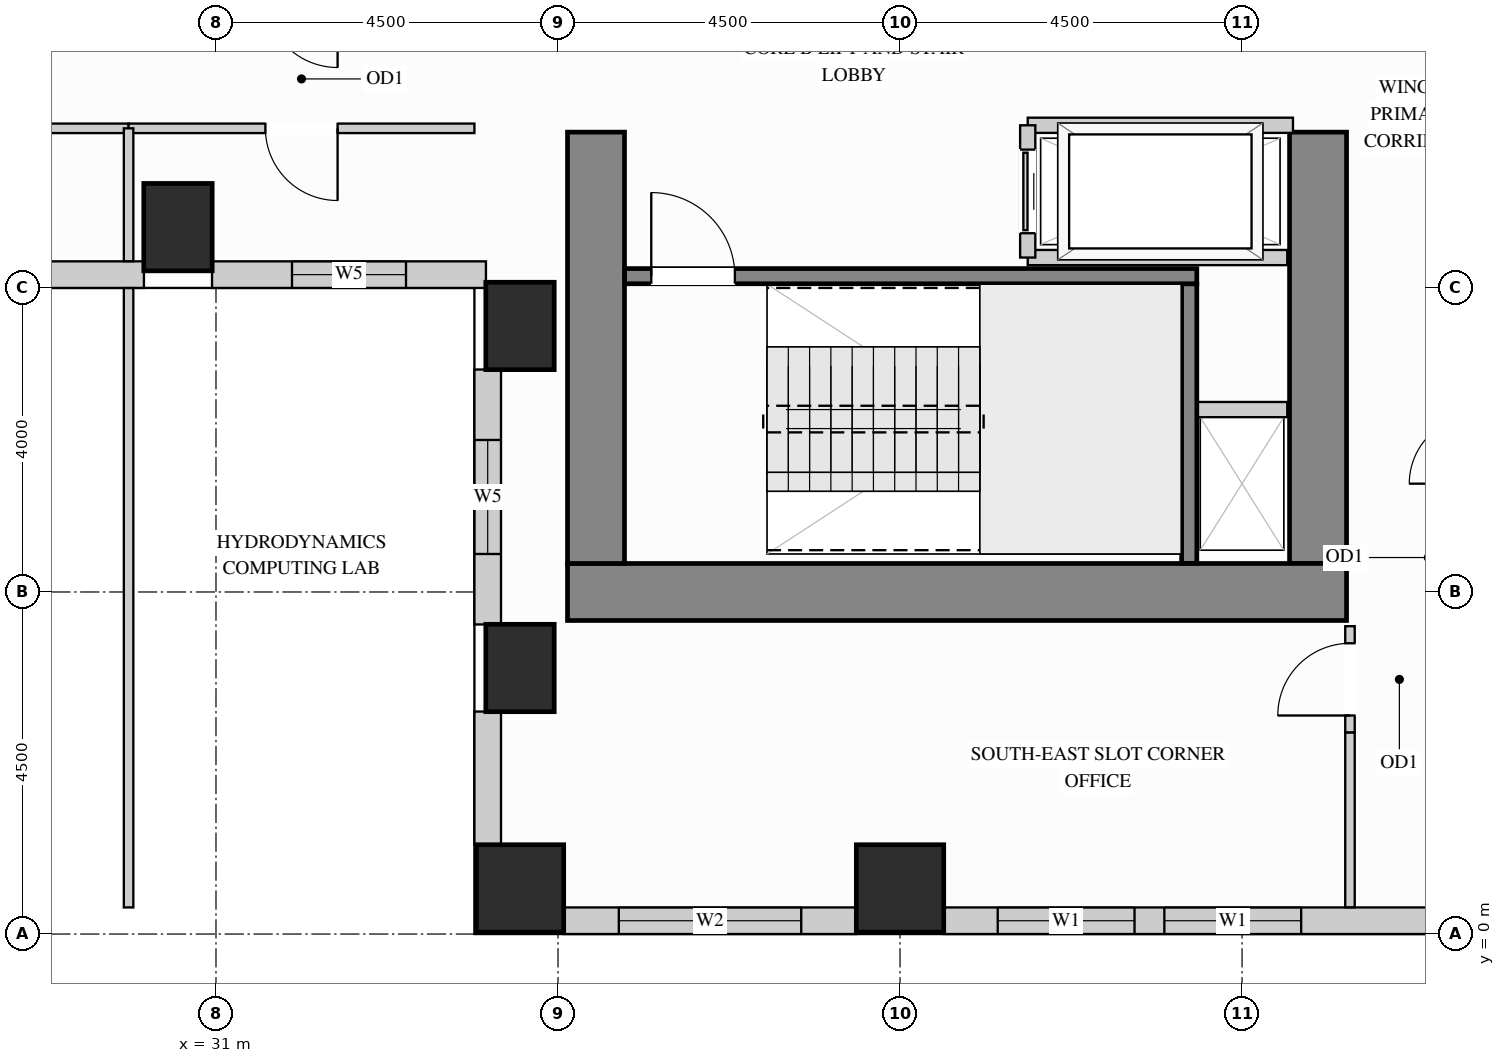
"""IFC4 building model, lengths in metres.
Left out: names, types, materials, properties, quantities, classifications, styles, units other than length and angle.
Written with IfcOpenShell. Run it as: python <this file> out.ifc"""

import sys

from ifc_helpers import new_model, si_unit, direction, frame, frame_2d, origin, origin_2d, place, context, subcontext, project, spatial, rectangle, extrude, source, transform, mapped, element, fill, save


model = new_model("IFC4")
c1 = context("Model", 3, precision=1e-05, world=origin(), true_north=direction((0.0, 1.0)))
c2 = subcontext(c1, "Body", "Model", "MODEL_VIEW")
j1 = project(units=[si_unit("LENGTHUNIT", "METRE"), si_unit("PLANEANGLEUNIT", "RADIAN")], contexts=[c1])
p1 = place(None, origin())
s1 = spatial("IfcSite", under=j1, at=p1, CompositionType="ELEMENT")
p2 = place(p1, origin())
s2 = spatial("IfcBuilding", under=s1, at=p2, CompositionType="ELEMENT")
p3 = place(p2, frame((0.0, 0.0, 95.4)))
s3 = spatial("IfcBuildingStorey", under=s2, at=p3, CompositionType="ELEMENT", Elevation=95.4)
m1 = source(origin(), c2, "Body", "SweptSolid", [
    extrude(rectangle(XDim=0.9, YDim=1.15, at=origin_2d()), origin(), (0.0, 0.0, 1.0), 3.38),
])
for number, where, z_axis, x_axis in (
    (1, (35.0, 3.5, 0.0), (0.0, 0.0, 1.0), (1.0, 0.0, 0.0)),
    (2, (35.0, 8.0, 0.0), (0.0, 0.0, 1.0), (1.0, 0.0, 0.0)),
    (3, (30.5, 9.3, 0.0), (0.0, 0.0, 1.0), (1.0, 0.0, 0.0)),
):
    element("IfcColumn", number, at=place(p3, frame(where, z_axis=z_axis, x_axis=x_axis)), inside=s3, PredefinedType="COLUMN", context=c2, shape_type="MappedRepresentation", body=[
        mapped(m1, transform((0.0, 0.0, 0.0), x_axis=(1.0, 0.0, 0.0), y_axis=(0.0, 1.0, 0.0), z_axis=(0.0, 0.0, 1.0))),
    ])
m2 = source(origin(), c2, "Body", "SweptSolid", [
    extrude(rectangle(XDim=1.15, YDim=1.15, at=origin_2d()), origin(), (0.0, 0.0, 1.0), 3.38),
])
for number, where, z_axis, x_axis in (
    (4, (35.0, 0.6, 0.0), (0.0, 0.0, 1.0), (1.0, 0.0, 0.0)),
    (5, (40.0, 0.6, 0.0), (0.0, 0.0, 1.0), (1.0, 0.0, 0.0)),
):
    element("IfcColumn", number, at=place(p3, frame(where, z_axis=z_axis, x_axis=x_axis)), inside=s3, PredefinedType="COLUMN", context=c2, shape_type="MappedRepresentation", body=[
        mapped(m2, transform((0.0, 0.0, 0.0), x_axis=(1.0, 0.0, 0.0), y_axis=(0.0, 1.0, 0.0), z_axis=(0.0, 0.0, 1.0))),
    ])
m3 = source(origin(), c2, "Body", "SweptSolid", [
    extrude(rectangle(XDim=5.675, YDim=0.75, at=frame_2d((2.837, 0.0))), origin(), (0.0, 0.0, 1.0), 3.38),
])
p4 = place(p3, frame((45.5, 4.875, 0.0), z_axis=(0.0, 0.0, 1.0), x_axis=(0.0, 1.0, 0.0)))
e6 = element("IfcWall", 6, at=p4, inside=s3, PredefinedType="SHEAR", context=c2, shape_type="MappedRepresentation", body=[
    mapped(m3, transform((0.0, 0.0, 0.0), x_axis=(1.0, 0.0, 0.0), y_axis=(0.0, 1.0, 0.0), z_axis=(0.0, 0.0, 1.0))),
])
m4 = source(origin(), c2, "Body", "SweptSolid", [
    extrude(rectangle(XDim=10.25, YDim=0.75, at=frame_2d((5.125, 0.0))), origin(), (0.0, 0.0, 1.0), 3.38),
])
p5 = place(p3, frame((35.625, 4.5, 0.0), z_axis=(0.0, 0.0, 1.0), x_axis=(1.0, 0.0, 0.0)))
e7 = element("IfcWall", 7, at=p5, inside=s3, PredefinedType="SHEAR", context=c2, shape_type="MappedRepresentation", body=[
    mapped(m4, transform((0.0, 0.0, 0.0), x_axis=(1.0, 0.0, 0.0), y_axis=(0.0, 1.0, 0.0), z_axis=(0.0, 0.0, 1.0))),
])
p6 = place(p3, frame((36.0, 4.875, 0.0), z_axis=(0.0, 0.0, 1.0), x_axis=(0.0, 1.0, 0.0)))
e8 = element("IfcWall", 8, at=p6, inside=s3, PredefinedType="SHEAR", context=c2, shape_type="MappedRepresentation", body=[
    mapped(m3, transform((0.0, 0.0, 0.0), x_axis=(1.0, 0.0, 0.0), y_axis=(0.0, 1.0, 0.0), z_axis=(0.0, 0.0, 1.0))),
])
p7 = place(p3, frame((23.848, 8.675, 0.0), z_axis=(0.0, 0.0, 1.0), x_axis=(1.0, 0.0, 0.0)))
e9 = element("IfcWall", 9, at=p7, inside=s3, PredefinedType="SOLIDWALL", context=c2, shape_type="SweptSolid", body=[
    extrude(rectangle(XDim=6.204, YDim=0.35, at=frame_2d((3.102, 0.0))), origin(), (0.0, 0.0, 1.0), 3.365),
])
p8 = place(p7, frame((1.131, 0.0, 0.78)))
e10 = element("IfcOpeningElement", 10, at=p8, cuts=e9, PredefinedType="OPENING", context=c2, shape_type="SweptSolid", body=[
    extrude(rectangle(XDim=1.5, YDim=2.0, at=frame_2d((0.75, 1.0))), frame((0.0, 0.185, 0.0), z_axis=(0.0, -1.0, 0.0), x_axis=(1.0, 0.0, 0.0)), (0.0, 0.0, 1.0), 0.37),
])
p9 = place(p7, frame((3.441, 0.0, 0.78)))
e11 = element("IfcOpeningElement", 11, at=p9, cuts=e9, PredefinedType="OPENING", context=c2, shape_type="SweptSolid", body=[
    extrude(rectangle(XDim=1.5, YDim=2.0, at=frame_2d((0.75, 1.0))), frame((0.0, 0.185, 0.0), z_axis=(0.0, -1.0, 0.0), x_axis=(1.0, 0.0, 0.0)), (0.0, 0.0, 1.0), 0.37),
])
p10 = place(p3, frame((30.948, 8.675, 0.0), z_axis=(0.0, 0.0, 1.0), x_axis=(1.0, 0.0, 0.0)))
e12 = element("IfcWall", 12, at=p10, inside=s3, PredefinedType="SOLIDWALL", context=c2, shape_type="SweptSolid", body=[
    extrude(rectangle(XDim=3.604, YDim=0.35, at=frame_2d((1.802, 0.0))), origin(), (0.0, 0.0, 1.0), 3.365),
])
p11 = place(p10, frame((1.052, 0.0, 0.78)))
e13 = element("IfcOpeningElement", 13, at=p11, cuts=e12, PredefinedType="OPENING", context=c2, shape_type="SweptSolid", body=[
    extrude(rectangle(XDim=1.5, YDim=2.0, at=frame_2d((0.75, 1.0))), frame((0.0, 0.185, 0.0), z_axis=(0.0, -1.0, 0.0), x_axis=(1.0, 0.0, 0.0)), (0.0, 0.0, 1.0), 0.37),
])
p12 = place(p3, frame((34.575, 7.427, 0.0), z_axis=(0.0, 0.0, 1.0), x_axis=(0.0, -1.0, 0.0)))
e14 = element("IfcWall", 14, at=p12, inside=s3, PredefinedType="SOLIDWALL", context=c2, shape_type="SweptSolid", body=[
    extrude(rectangle(XDim=3.354, YDim=0.35, at=frame_2d((1.677, 0.0))), origin(), (0.0, 0.0, 1.0), 3.365),
])
p13 = place(p12, frame((0.927, 0.0, 0.78)))
e15 = element("IfcOpeningElement", 15, at=p13, cuts=e14, PredefinedType="OPENING", context=c2, shape_type="SweptSolid", body=[
    extrude(rectangle(XDim=1.5, YDim=2.0, at=frame_2d((0.75, 1.0))), frame((0.0, 0.185, 0.0), z_axis=(0.0, -1.0, 0.0), x_axis=(1.0, 0.0, 0.0)), (0.0, 0.0, 1.0), 0.37),
])
m5 = source(origin(), c2, "Body", "SweptSolid", [
    extrude(rectangle(XDim=1.754, YDim=0.35, at=frame_2d((0.877, 0.0))), origin(), (0.0, 0.0, 1.0), 3.365),
])
p14 = place(p3, frame((34.575, 2.927, 0.0), z_axis=(0.0, 0.0, 1.0), x_axis=(0.0, -1.0, 0.0)))
e16 = element("IfcWall", 16, at=p14, inside=s3, PredefinedType="SOLIDWALL", context=c2, shape_type="MappedRepresentation", body=[
    mapped(m5, transform((0.0, 0.0, 0.0), x_axis=(1.0, 0.0, 0.0), y_axis=(0.0, 1.0, 0.0), z_axis=(0.0, 0.0, 1.0))),
])
p15 = place(p3, frame((35.573, 0.175, 0.0), z_axis=(0.0, 0.0, 1.0), x_axis=(1.0, 0.0, 0.0)))
e17 = element("IfcWall", 17, at=p15, inside=s3, PredefinedType="SOLIDWALL", context=c2, shape_type="SweptSolid", body=[
    extrude(rectangle(XDim=3.854, YDim=0.35, at=frame_2d((1.927, 0.0))), origin(), (0.0, 0.0, 1.0), 3.365),
])
p16 = place(p15, frame((0.727, 0.0, 0.78)))
e18 = element("IfcOpeningElement", 18, at=p16, cuts=e17, PredefinedType="OPENING", context=c2, shape_type="SweptSolid", body=[
    extrude(rectangle(XDim=2.4, YDim=2.1, at=frame_2d((1.2, 1.05))), frame((0.0, 0.185, 0.0), z_axis=(0.0, -1.0, 0.0), x_axis=(1.0, 0.0, 0.0)), (0.0, 0.0, 1.0), 0.37),
])
p17 = place(p3, frame((40.573, 0.175, 0.0), z_axis=(0.0, 0.0, 1.0), x_axis=(1.0, 0.0, 0.0)))
e19 = element("IfcWall", 19, at=p17, inside=s3, PredefinedType="SOLIDWALL", context=c2, shape_type="SweptSolid", body=[
    extrude(rectangle(XDim=6.454, YDim=0.35, at=frame_2d((3.227, 0.0))), origin(), (0.0, 0.0, 1.0), 3.365),
])
p18 = place(p17, frame((0.712, 0.0, 0.78)))
e20 = element("IfcOpeningElement", 20, at=p18, cuts=e19, PredefinedType="OPENING", context=c2, shape_type="SweptSolid", body=[
    extrude(rectangle(XDim=1.8, YDim=2.1, at=frame_2d((0.9, 1.05))), frame((0.0, 0.185, 0.0), z_axis=(0.0, -1.0, 0.0), x_axis=(1.0, 0.0, 0.0)), (0.0, 0.0, 1.0), 0.37),
])
p19 = place(p17, frame((2.905, 0.0, 0.78)))
e21 = element("IfcOpeningElement", 21, at=p19, cuts=e19, PredefinedType="OPENING", context=c2, shape_type="SweptSolid", body=[
    extrude(rectangle(XDim=1.8, YDim=2.1, at=frame_2d((0.9, 1.05))), frame((0.0, 0.185, 0.0), z_axis=(0.0, -1.0, 0.0), x_axis=(1.0, 0.0, 0.0)), (0.0, 0.0, 1.0), 0.37),
])
p20 = place(p3, frame((45.92, 2.65, 0.0), z_axis=(0.0, 0.0, 1.0), x_axis=(0.0, 1.0, 0.0)))
e22 = element("IfcWall", 22, at=p20, inside=s3, PredefinedType="PARTITIONING", context=c2, shape_type="SweptSolid", body=[
    extrude(rectangle(XDim=1.4, YDim=0.125, at=frame_2d((0.7, 0.0))), origin(), (0.0, 0.0, 1.0), 3.365),
])
p21 = place(p20, frame((0.225, 0.0, 0.0)))
e23 = element("IfcOpeningElement", 23, at=p21, cuts=e22, PredefinedType="OPENING", context=c2, shape_type="SweptSolid", body=[
    extrude(rectangle(XDim=0.95, YDim=2.15, at=frame_2d((0.475, 1.075))), frame((0.0, 0.073, 0.0), z_axis=(0.0, -1.0, 0.0), x_axis=(1.0, 0.0, 0.0)), (0.0, 0.0, 1.0), 0.145),
])
m6 = source(origin(), c2, "Body", "SweptSolid", [
    extrude(rectangle(XDim=2.298, YDim=0.125, at=frame_2d((1.149, 0.0))), origin(), (0.0, 0.0, 1.0), 3.365),
])
p22 = place(p3, frame((45.92, 0.352, 0.0), z_axis=(0.0, 0.0, 1.0), x_axis=(0.0, 1.0, 0.0)))
e24 = element("IfcWall", 24, at=p22, inside=s3, PredefinedType="PARTITIONING", context=c2, shape_type="MappedRepresentation", body=[
    mapped(m6, transform((0.0, 0.0, 0.0), x_axis=(1.0, 0.0, 0.0), y_axis=(0.0, 1.0, 0.0), z_axis=(0.0, 0.0, 1.0))),
])
p23 = place(p3, frame((23.85, 10.6, 0.0), z_axis=(0.0, 0.0, 1.0), x_axis=(1.0, 0.0, 0.0)))
e25 = element("IfcWall", 25, at=p23, inside=s3, PredefinedType="PARTITIONING", context=c2, shape_type="SweptSolid", body=[
    extrude(rectangle(XDim=6.0, YDim=0.125, at=frame_2d((3.0, 0.0))), origin(), (0.0, 0.0, 1.0), 3.365),
])
p24 = place(p23, frame((2.525, 0.0, 0.0)))
e26 = element("IfcOpeningElement", 26, at=p24, cuts=e25, PredefinedType="OPENING", context=c2, shape_type="SweptSolid", body=[
    extrude(rectangle(XDim=0.95, YDim=2.15, at=frame_2d((0.475, 1.075))), frame((0.0, 0.073, 0.0), z_axis=(0.0, -1.0, 0.0), x_axis=(1.0, 0.0, 0.0)), (0.0, 0.0, 1.0), 0.145),
])
p25 = place(p3, frame((29.85, 10.6, 0.0), z_axis=(0.0, 0.0, 1.0), x_axis=(1.0, 0.0, 0.0)))
e27 = element("IfcWall", 27, at=p25, inside=s3, PredefinedType="PARTITIONING", context=c2, shape_type="SweptSolid", body=[
    extrude(rectangle(XDim=4.55, YDim=0.125, at=frame_2d((2.275, 0.0))), origin(), (0.0, 0.0, 1.0), 3.365),
])
p26 = place(p25, frame((1.8, 0.0, 0.0)))
e28 = element("IfcOpeningElement", 28, at=p26, cuts=e27, PredefinedType="OPENING", context=c2, shape_type="SweptSolid", body=[
    extrude(rectangle(XDim=0.95, YDim=2.15, at=frame_2d((0.475, 1.075))), frame((0.0, 0.073, 0.0), z_axis=(0.0, -1.0, 0.0), x_axis=(1.0, 0.0, 0.0)), (0.0, 0.0, 1.0), 0.145),
])
m7 = source(origin(), c2, "Body", "SweptSolid", [
    extrude(rectangle(XDim=8.148, YDim=0.125, at=frame_2d((4.074, 0.0))), origin(), (0.0, 0.0, 1.0), 3.365),
])
p27 = place(p3, frame((29.85, 0.35, 0.0), z_axis=(0.0, 0.0, 1.0), x_axis=(0.0, 1.0, 0.0)))
e29 = element("IfcWall", 29, at=p27, inside=s3, PredefinedType="PARTITIONING", context=c2, shape_type="MappedRepresentation", body=[
    mapped(m7, transform((0.0, 0.0, 0.0), x_axis=(1.0, 0.0, 0.0), y_axis=(0.0, 1.0, 0.0), z_axis=(0.0, 0.0, 1.0))),
])
m8 = source(origin(), c2, "Body", "SweptSolid", [
    extrude(rectangle(XDim=1.748, YDim=0.125, at=frame_2d((0.874, 0.0))), origin(), (0.0, 0.0, 1.0), 3.365),
])
p28 = place(p3, frame((29.85, 8.852, 0.0), z_axis=(0.0, 0.0, 1.0), x_axis=(0.0, 1.0, 0.0)))
e30 = element("IfcWall", 30, at=p28, inside=s3, PredefinedType="PARTITIONING", context=c2, shape_type="MappedRepresentation", body=[
    mapped(m8, transform((0.0, 0.0, 0.0), x_axis=(1.0, 0.0, 0.0), y_axis=(0.0, 1.0, 0.0), z_axis=(0.0, 0.0, 1.0))),
])
m9 = source(origin(), c2, "Body", "SweptSolid", [
    extrude(rectangle(XDim=1.245, YDim=0.2, at=frame_2d((0.623, 0.0))), origin(), (0.0, 0.0, 1.0), 3.365),
])
p29 = place(p3, frame((43.85, 6.9, 0.0), z_axis=(0.0, 0.0, 1.0), x_axis=(1.0, 0.0, 0.0)))
e31 = element("IfcWall", 31, at=p29, inside=s3, PredefinedType="PARTITIONING", context=c2, shape_type="MappedRepresentation", body=[
    mapped(m9, transform((0.0, 0.0, 0.0), x_axis=(1.0, 0.0, 0.0), y_axis=(0.0, 1.0, 0.0), z_axis=(0.0, 0.0, 1.0))),
])
m10 = source(origin(), c2, "Body", "SweptSolid", [
    extrude(rectangle(XDim=3.49, YDim=0.2, at=frame_2d((1.745, 0.0))), origin(), (0.0, 0.0, 1.0), 3.365),
])
p30 = place(p3, frame((41.68, 10.64, 0.0), z_axis=(0.0, 0.0, 1.0), x_axis=(1.0, 0.0, 0.0)))
e32 = element("IfcWall", 32, at=p30, inside=s3, PredefinedType="PARTITIONING", context=c2, shape_type="MappedRepresentation", body=[
    mapped(m10, transform((0.0, 0.0, 0.0), x_axis=(1.0, 0.0, 0.0), y_axis=(0.0, 1.0, 0.0), z_axis=(0.0, 0.0, 1.0))),
])
m11 = source(origin(), c2, "Body", "SweptSolid", [
    extrude(rectangle(XDim=3.415, YDim=0.2, at=frame_2d((1.708, 0.0))), origin(), (0.0, 0.0, 1.0), 3.365),
])
p31 = place(p3, frame((41.68, 8.9, 0.0), z_axis=(0.0, 0.0, 1.0), x_axis=(1.0, 0.0, 0.0)))
e33 = element("IfcWall", 33, at=p31, inside=s3, PredefinedType="PARTITIONING", context=c2, shape_type="MappedRepresentation", body=[
    mapped(m11, transform((0.0, 0.0, 0.0), x_axis=(1.0, 0.0, 0.0), y_axis=(0.0, 1.0, 0.0), z_axis=(0.0, 0.0, 1.0))),
])
p32 = place(p3, frame((41.68, 8.9, 0.0), z_axis=(0.0, 0.0, 1.0), x_axis=(0.0, 1.0, 0.0)))
e34 = element("IfcWall", 34, at=p32, inside=s3, PredefinedType="PARTITIONING", context=c2, shape_type="SweptSolid", body=[
    extrude(rectangle(XDim=1.74, YDim=0.2, at=frame_2d((0.87, 0.0))), origin(), (0.0, 0.0, 1.0), 3.365),
])
p33 = place(p32, frame((0.32, 0.0, 0.0)))
e35 = element("IfcOpeningElement", 35, at=p33, cuts=e34, PredefinedType="OPENING", context=c2, shape_type="SweptSolid", body=[
    extrude(rectangle(XDim=1.1, YDim=2.2, at=frame_2d((0.55, 1.1))), frame((0.0, 0.11, 0.0), z_axis=(0.0, -1.0, 0.0), x_axis=(1.0, 0.0, 0.0)), (0.0, 0.0, 1.0), 0.22),
])
m12 = source(origin(), c2, "Body", "SweptSolid", [
    extrude(rectangle(XDim=3.678, YDim=0.2, at=frame_2d((1.839, 0.0))), origin(), (0.0, 0.0, 1.0), 3.38),
])
p34 = place(p3, frame((43.805, 4.877, 0.0), z_axis=(0.0, 0.0, 1.0), x_axis=(0.0, 1.0, 0.0)))
e36 = element("IfcWall", 36, at=p34, inside=s3, PredefinedType="SHEAR", context=c2, shape_type="MappedRepresentation", body=[
    mapped(m12, transform((0.0, 0.0, 0.0), x_axis=(1.0, 0.0, 0.0), y_axis=(0.0, 1.0, 0.0), z_axis=(0.0, 0.0, 1.0))),
])
p35 = place(p3, frame((36.377, 8.655, 0.0), z_axis=(0.0, 0.0, 1.0), x_axis=(1.0, 0.0, 0.0)))
e37 = element("IfcWall", 37, at=p35, inside=s3, PredefinedType="SHEAR", context=c2, shape_type="SweptSolid", body=[
    extrude(rectangle(XDim=7.528, YDim=0.2, at=frame_2d((3.764, 0.0))), origin(), (0.0, 0.0, 1.0), 3.38),
])
p36 = place(p35, frame((0.35, 0.0, 0.0)))
e38 = element("IfcOpeningElement", 38, at=p36, cuts=e37, PredefinedType="OPENING", context=c2, shape_type="SweptSolid", body=[
    extrude(rectangle(XDim=1.1, YDim=2.15, at=frame_2d((0.55, 1.075))), frame((0.0, 0.11, 0.0), z_axis=(0.0, -1.0, 0.0), x_axis=(1.0, 0.0, 0.0)), (0.0, 0.0, 1.0), 0.22),
])
m13 = source(origin(), c2, "Body", "SweptSolid", [
    extrude(rectangle(XDim=1.1, YDim=2.2, at=frame_2d((0.55, 1.1))), frame((0.0, 0.025, 0.0), z_axis=(0.0, -1.0, 0.0), x_axis=(1.0, 0.0, 0.0)), (0.0, 0.0, 1.0), 0.05),
])
p37 = place(p33, origin())
e39 = element("IfcDoor", 39, at=p37, inside=s3, OperationType="SLIDING_TO_LEFT", PredefinedType="DOOR", context=c2, shape_type="MappedRepresentation", body=[
    mapped(m13, transform((0.0, 0.0, 0.0), x_axis=(1.0, 0.0, 0.0), y_axis=(0.0, 1.0, 0.0), z_axis=(0.0, 0.0, 1.0))),
])
fill(e35, e39)
m14 = source(origin(), c2, "Body", "SweptSolid", [
    extrude(rectangle(XDim=0.95, YDim=2.15, at=frame_2d((0.475, 1.075))), frame((0.0, 0.025, 0.0), z_axis=(0.0, -1.0, 0.0), x_axis=(1.0, 0.0, 0.0)), (0.0, 0.0, 1.0), 0.05),
])
p38 = place(p21, origin())
e40 = element("IfcDoor", 40, at=p38, inside=s3, OperationType="SINGLE_SWING_LEFT", PredefinedType="DOOR", context=c2, shape_type="MappedRepresentation", body=[
    mapped(m14, transform((0.0, 0.0, 0.0), x_axis=(1.0, 0.0, 0.0), y_axis=(0.0, 1.0, 0.0), z_axis=(0.0, 0.0, 1.0))),
])
fill(e23, e40)
p39 = place(p26, origin())
e41 = element("IfcDoor", 41, at=p39, inside=s3, OperationType="SINGLE_SWING_RIGHT", PredefinedType="DOOR", context=c2, shape_type="MappedRepresentation", body=[
    mapped(m14, transform((0.0, 0.0, 0.0), x_axis=(1.0, 0.0, 0.0), y_axis=(0.0, 1.0, 0.0), z_axis=(0.0, 0.0, 1.0))),
])
fill(e28, e41)
m15 = source(origin(), c2, "Body", "SweptSolid", [
    extrude(rectangle(XDim=1.1, YDim=2.15, at=frame_2d((0.55, 1.075))), frame((0.0, 0.025, 0.0), z_axis=(0.0, -1.0, 0.0), x_axis=(1.0, 0.0, 0.0)), (0.0, 0.0, 1.0), 0.05),
])
p40 = place(p36, origin())
e42 = element("IfcDoor", 42, at=p40, inside=s3, OperationType="SINGLE_SWING_LEFT", PredefinedType="DOOR", context=c2, shape_type="MappedRepresentation", body=[
    mapped(m15, transform((0.0, 0.0, 0.0), x_axis=(1.0, 0.0, 0.0), y_axis=(0.0, 1.0, 0.0), z_axis=(0.0, 0.0, 1.0))),
])
fill(e38, e42)
m16 = source(origin(), c2, "Body", "SweptSolid", [
    extrude(rectangle(XDim=1.8, YDim=2.1, at=frame_2d((0.9, 1.05))), frame((0.0, 0.03, 0.0), z_axis=(0.0, -1.0, 0.0), x_axis=(1.0, 0.0, 0.0)), (0.0, 0.0, 1.0), 0.06),
])
p41 = place(p18, origin())
e43 = element("IfcWindow", 43, at=p41, inside=s3, PartitioningType="SINGLE_PANEL", PredefinedType="WINDOW", context=c2, shape_type="MappedRepresentation", body=[
    mapped(m16, transform((0.0, 0.0, 0.0), x_axis=(1.0, 0.0, 0.0), y_axis=(0.0, 1.0, 0.0), z_axis=(0.0, 0.0, 1.0))),
])
fill(e20, e43)
p42 = place(p19, origin())
e44 = element("IfcWindow", 44, at=p42, inside=s3, PartitioningType="SINGLE_PANEL", PredefinedType="WINDOW", context=c2, shape_type="MappedRepresentation", body=[
    mapped(m16, transform((0.0, 0.0, 0.0), x_axis=(1.0, 0.0, 0.0), y_axis=(0.0, 1.0, 0.0), z_axis=(0.0, 0.0, 1.0))),
])
fill(e21, e44)
m17 = source(origin(), c2, "Body", "SweptSolid", [
    extrude(rectangle(XDim=2.4, YDim=2.1, at=frame_2d((1.2, 1.05))), frame((0.0, 0.03, 0.0), z_axis=(0.0, -1.0, 0.0), x_axis=(1.0, 0.0, 0.0)), (0.0, 0.0, 1.0), 0.06),
])
p43 = place(p16, origin())
e45 = element("IfcWindow", 45, at=p43, inside=s3, PartitioningType="SINGLE_PANEL", PredefinedType="WINDOW", context=c2, shape_type="MappedRepresentation", body=[
    mapped(m17, transform((0.0, 0.0, 0.0), x_axis=(1.0, 0.0, 0.0), y_axis=(0.0, 1.0, 0.0), z_axis=(0.0, 0.0, 1.0))),
])
fill(e18, e45)
m18 = source(origin(), c2, "Body", "SweptSolid", [
    extrude(rectangle(XDim=1.5, YDim=2.0, at=frame_2d((0.75, 1.0))), frame((0.0, 0.03, 0.0), z_axis=(0.0, -1.0, 0.0), x_axis=(1.0, 0.0, 0.0)), (0.0, 0.0, 1.0), 0.06),
])
p44 = place(p11, origin())
e46 = element("IfcWindow", 46, at=p44, inside=s3, PartitioningType="SINGLE_PANEL", PredefinedType="WINDOW", context=c2, shape_type="MappedRepresentation", body=[
    mapped(m18, transform((0.0, 0.0, 0.0), x_axis=(1.0, 0.0, 0.0), y_axis=(0.0, 1.0, 0.0), z_axis=(0.0, 0.0, 1.0))),
])
fill(e13, e46)
p45 = place(p13, origin())
e47 = element("IfcWindow", 47, at=p45, inside=s3, PartitioningType="SINGLE_PANEL", PredefinedType="WINDOW", context=c2, shape_type="MappedRepresentation", body=[
    mapped(m18, transform((0.0, 0.0, 0.0), x_axis=(1.0, 0.0, 0.0), y_axis=(0.0, 1.0, 0.0), z_axis=(0.0, 0.0, 1.0))),
])
fill(e15, e47)
save(model, sys.argv[1])
